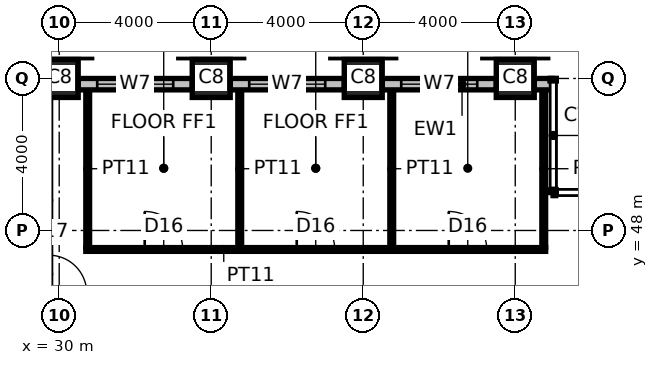
"""IFC4 building model, lengths in metres.
Left out: names, types, materials, properties, quantities, classifications, styles, units other than length and angle.
Written with IfcOpenShell. Run it as: python <this file> out.ifc"""

import sys

from ifc_helpers import new_model, si_unit, direction, frame, frame_2d, origin, origin_2d, place, context, subcontext, project, spatial, rectangle, hollow_rectangle, extrude, element, fill, save


model = new_model("IFC4")
c1 = context("Model", 3, precision=1e-05, world=origin(), true_north=direction((0.0, 1.0)))
c2 = subcontext(c1, "Body", "Model", "MODEL_VIEW")
j1 = project(units=[si_unit("LENGTHUNIT", "METRE"), si_unit("PLANEANGLEUNIT", "RADIAN")], contexts=[c1])
p1 = place(None, origin())
s1 = spatial("IfcSite", under=j1, at=p1, CompositionType="ELEMENT")
p2 = place(p1, origin())
s2 = spatial("IfcBuilding", under=s1, at=p2, CompositionType="ELEMENT")
p3 = place(p2, frame((0.0, 0.0, 167.8)))
s3 = spatial("IfcBuildingStorey", under=s2, at=p3, CompositionType="ELEMENT", Elevation=167.8)
for number, where, z_axis, x_axis in (
    (1, (30.0, 52.0, 0.0), (0.0, 0.0, 1.0), (1.0, 0.0, 0.0)),
    (2, (34.0, 52.0, 0.0), (0.0, 0.0, 1.0), (1.0, 0.0, 0.0)),
    (3, (38.0, 52.0, 0.0), (0.0, 0.0, 1.0), (1.0, 0.0, 0.0)),
    (4, (42.0, 52.0, 0.0), (0.0, 0.0, 1.0), (1.0, 0.0, 0.0)),
):
    element("IfcColumn", number, at=place(p3, frame(where, z_axis=z_axis, x_axis=x_axis)), inside=s3, PredefinedType="COLUMN", context=c2, shape_type="SweptSolid", body=[
        extrude(hollow_rectangle(XDim=1.0, YDim=1.0, WallThickness=0.125, at=origin_2d()), origin(), (0.0, 0.0, 1.0), 4.0),
    ])
p4 = place(p3, frame((30.7, 47.5, 0.0), z_axis=(0.0, 0.0, 1.0), x_axis=(1.0, 0.0, 0.0)))
e5 = element("IfcWall", 5, at=p4, inside=s3, PredefinedType="PARTITIONING", context=c2, shape_type="SweptSolid", body=[
    extrude(rectangle(XDim=12.1, YDim=0.1, at=frame_2d((6.05, 0.0))), origin(), (0.0, 0.0, 1.0), 3.85),
])
p5 = place(p4, frame((1.55, 0.0, 0.0)))
e6 = element("IfcOpeningElement", 6, at=p5, cuts=e5, PredefinedType="OPENING", context=c2, shape_type="SweptSolid", body=[
    extrude(rectangle(XDim=1.0, YDim=2.2, at=frame_2d((0.5, 1.1))), frame((0.0, 0.06, 0.0), z_axis=(0.0, -1.0, 0.0), x_axis=(1.0, 0.0, 0.0)), (0.0, 0.0, 1.0), 0.12),
])
p6 = place(p4, frame((5.55, 0.0, 0.0)))
e7 = element("IfcOpeningElement", 7, at=p6, cuts=e5, PredefinedType="OPENING", context=c2, shape_type="SweptSolid", body=[
    extrude(rectangle(XDim=1.0, YDim=2.2, at=frame_2d((0.5, 1.1))), frame((0.0, 0.06, 0.0), z_axis=(0.0, -1.0, 0.0), x_axis=(1.0, 0.0, 0.0)), (0.0, 0.0, 1.0), 0.12),
])
p7 = place(p4, frame((9.55, 0.0, 0.0)))
e8 = element("IfcOpeningElement", 8, at=p7, cuts=e5, PredefinedType="OPENING", context=c2, shape_type="SweptSolid", body=[
    extrude(rectangle(XDim=1.0, YDim=2.2, at=frame_2d((0.5, 1.1))), frame((0.0, 0.06, 0.0), z_axis=(0.0, -1.0, 0.0), x_axis=(1.0, 0.0, 0.0)), (0.0, 0.0, 1.0), 0.12),
])
for number, where, z_axis, x_axis in (
    (9, (30.75, 47.55, 0.0), (0.0, 0.0, 1.0), (0.0, 1.0, 0.0)),
    (10, (34.75, 47.55, 0.0), (0.0, 0.0, 1.0), (0.0, 1.0, 0.0)),
    (11, (38.75, 47.55, 0.0), (0.0, 0.0, 1.0), (0.0, 1.0, 0.0)),
    (12, (42.75, 47.55, 0.0), (0.0, 0.0, 1.0), (0.0, 1.0, 0.0)),
):
    element("IfcWall", number, at=place(p3, frame(where, z_axis=z_axis, x_axis=x_axis)), inside=s3, PredefinedType="PARTITIONING", context=c2, shape_type="SweptSolid", body=[
        extrude(rectangle(XDim=4.15, YDim=0.1, at=frame_2d((2.075, 0.0))), origin(), (0.0, 0.0, 1.0), 3.85),
    ])
p8 = place(p3, frame((33.5, 51.85, 0.0), z_axis=(0.0, 0.0, 1.0), x_axis=(-1.0, 0.0, 0.0)))
e13 = element("IfcWall", 13, at=p8, inside=s3, PredefinedType="ELEMENTEDWALL", context=c2, shape_type="SweptSolid", body=[
    extrude(rectangle(XDim=3.0, YDim=0.3, at=frame_2d((1.5, 0.0))), origin(), (0.0, 0.0, 1.0), 2.65),
])
p9 = place(p8, frame((0.5, 0.0, 0.8)))
e14 = element("IfcOpeningElement", 14, at=p9, cuts=e13, PredefinedType="OPENING", context=c2, shape_type="SweptSolid", body=[
    extrude(rectangle(XDim=2.0, YDim=1.8, at=frame_2d((1.0, 0.9))), frame((0.0, 0.16, 0.0), z_axis=(0.0, -1.0, 0.0), x_axis=(1.0, 0.0, 0.0)), (0.0, 0.0, 1.0), 0.32),
])
p10 = place(p3, frame((37.5, 51.85, 0.0), z_axis=(0.0, 0.0, 1.0), x_axis=(-1.0, 0.0, 0.0)))
e15 = element("IfcWall", 15, at=p10, inside=s3, PredefinedType="ELEMENTEDWALL", context=c2, shape_type="SweptSolid", body=[
    extrude(rectangle(XDim=3.0, YDim=0.3, at=frame_2d((1.5, 0.0))), origin(), (0.0, 0.0, 1.0), 2.65),
])
p11 = place(p10, frame((0.5, 0.0, 0.8)))
e16 = element("IfcOpeningElement", 16, at=p11, cuts=e15, PredefinedType="OPENING", context=c2, shape_type="SweptSolid", body=[
    extrude(rectangle(XDim=2.0, YDim=1.8, at=frame_2d((1.0, 0.9))), frame((0.0, 0.16, 0.0), z_axis=(0.0, -1.0, 0.0), x_axis=(1.0, 0.0, 0.0)), (0.0, 0.0, 1.0), 0.32),
])
p12 = place(p3, frame((41.5, 51.85, 0.0), z_axis=(0.0, 0.0, 1.0), x_axis=(-1.0, 0.0, 0.0)))
e17 = element("IfcWall", 17, at=p12, inside=s3, PredefinedType="ELEMENTEDWALL", context=c2, shape_type="SweptSolid", body=[
    extrude(rectangle(XDim=3.0, YDim=0.3, at=frame_2d((1.5, 0.0))), origin(), (0.0, 0.0, 1.0), 2.65),
])
p13 = place(p12, frame((0.5, 0.0, 0.8)))
e18 = element("IfcOpeningElement", 18, at=p13, cuts=e17, PredefinedType="OPENING", context=c2, shape_type="SweptSolid", body=[
    extrude(rectangle(XDim=2.0, YDim=1.8, at=frame_2d((1.0, 0.9))), frame((0.0, 0.16, 0.0), z_axis=(0.0, -1.0, 0.0), x_axis=(1.0, 0.0, 0.0)), (0.0, 0.0, 1.0), 0.32),
])
p14 = place(p3, frame((42.97, 51.85, 0.0), z_axis=(0.0, 0.0, 1.0), x_axis=(-1.0, 0.0, 0.0)))
e19 = element("IfcWall", 19, at=p14, inside=s3, PredefinedType="ELEMENTEDWALL", context=c2, shape_type="SweptSolid", body=[
    extrude(rectangle(XDim=0.47, YDim=0.3, at=frame_2d((0.235, 0.0))), origin(), (0.0, 0.0, 1.0), 2.65),
])
p15 = place(p5, origin())
e20 = element("IfcDoor", 20, at=p15, inside=s3, OperationType="SINGLE_SWING_LEFT", PredefinedType="DOOR", context=c2, shape_type="SweptSolid", body=[
    extrude(rectangle(XDim=1.0, YDim=2.2, at=frame_2d((0.5, 1.1))), frame((0.0, 0.025, 0.0), z_axis=(0.0, -1.0, 0.0), x_axis=(1.0, 0.0, 0.0)), (0.0, 0.0, 1.0), 0.05),
])
fill(e6, e20)
p16 = place(p6, origin())
e21 = element("IfcDoor", 21, at=p16, inside=s3, OperationType="SINGLE_SWING_LEFT", PredefinedType="DOOR", context=c2, shape_type="SweptSolid", body=[
    extrude(rectangle(XDim=1.0, YDim=2.2, at=frame_2d((0.5, 1.1))), frame((0.0, 0.025, 0.0), z_axis=(0.0, -1.0, 0.0), x_axis=(1.0, 0.0, 0.0)), (0.0, 0.0, 1.0), 0.05),
])
fill(e7, e21)
p17 = place(p7, origin())
e22 = element("IfcDoor", 22, at=p17, inside=s3, OperationType="SINGLE_SWING_LEFT", PredefinedType="DOOR", context=c2, shape_type="SweptSolid", body=[
    extrude(rectangle(XDim=1.0, YDim=2.2, at=frame_2d((0.5, 1.1))), frame((0.0, 0.025, 0.0), z_axis=(0.0, -1.0, 0.0), x_axis=(1.0, 0.0, 0.0)), (0.0, 0.0, 1.0), 0.05),
])
fill(e8, e22)
p18 = place(p9, origin())
e23 = element("IfcWindow", 23, at=p18, inside=s3, PartitioningType="SINGLE_PANEL", PredefinedType="WINDOW", context=c2, shape_type="SweptSolid", body=[
    extrude(rectangle(XDim=2.0, YDim=1.8, at=frame_2d((1.0, 0.9))), frame((0.0, 0.03, 0.0), z_axis=(0.0, -1.0, 0.0), x_axis=(1.0, 0.0, 0.0)), (0.0, 0.0, 1.0), 0.06),
])
fill(e14, e23)
p19 = place(p11, origin())
e24 = element("IfcWindow", 24, at=p19, inside=s3, PartitioningType="SINGLE_PANEL", PredefinedType="WINDOW", context=c2, shape_type="SweptSolid", body=[
    extrude(rectangle(XDim=2.0, YDim=1.8, at=frame_2d((1.0, 0.9))), frame((0.0, 0.03, 0.0), z_axis=(0.0, -1.0, 0.0), x_axis=(1.0, 0.0, 0.0)), (0.0, 0.0, 1.0), 0.06),
])
fill(e16, e24)
p20 = place(p13, origin())
e25 = element("IfcWindow", 25, at=p20, inside=s3, PartitioningType="SINGLE_PANEL", PredefinedType="WINDOW", context=c2, shape_type="SweptSolid", body=[
    extrude(rectangle(XDim=2.0, YDim=1.8, at=frame_2d((1.0, 0.9))), frame((0.0, 0.03, 0.0), z_axis=(0.0, -1.0, 0.0), x_axis=(1.0, 0.0, 0.0)), (0.0, 0.0, 1.0), 0.06),
])
fill(e18, e25)
save(model, sys.argv[1])
